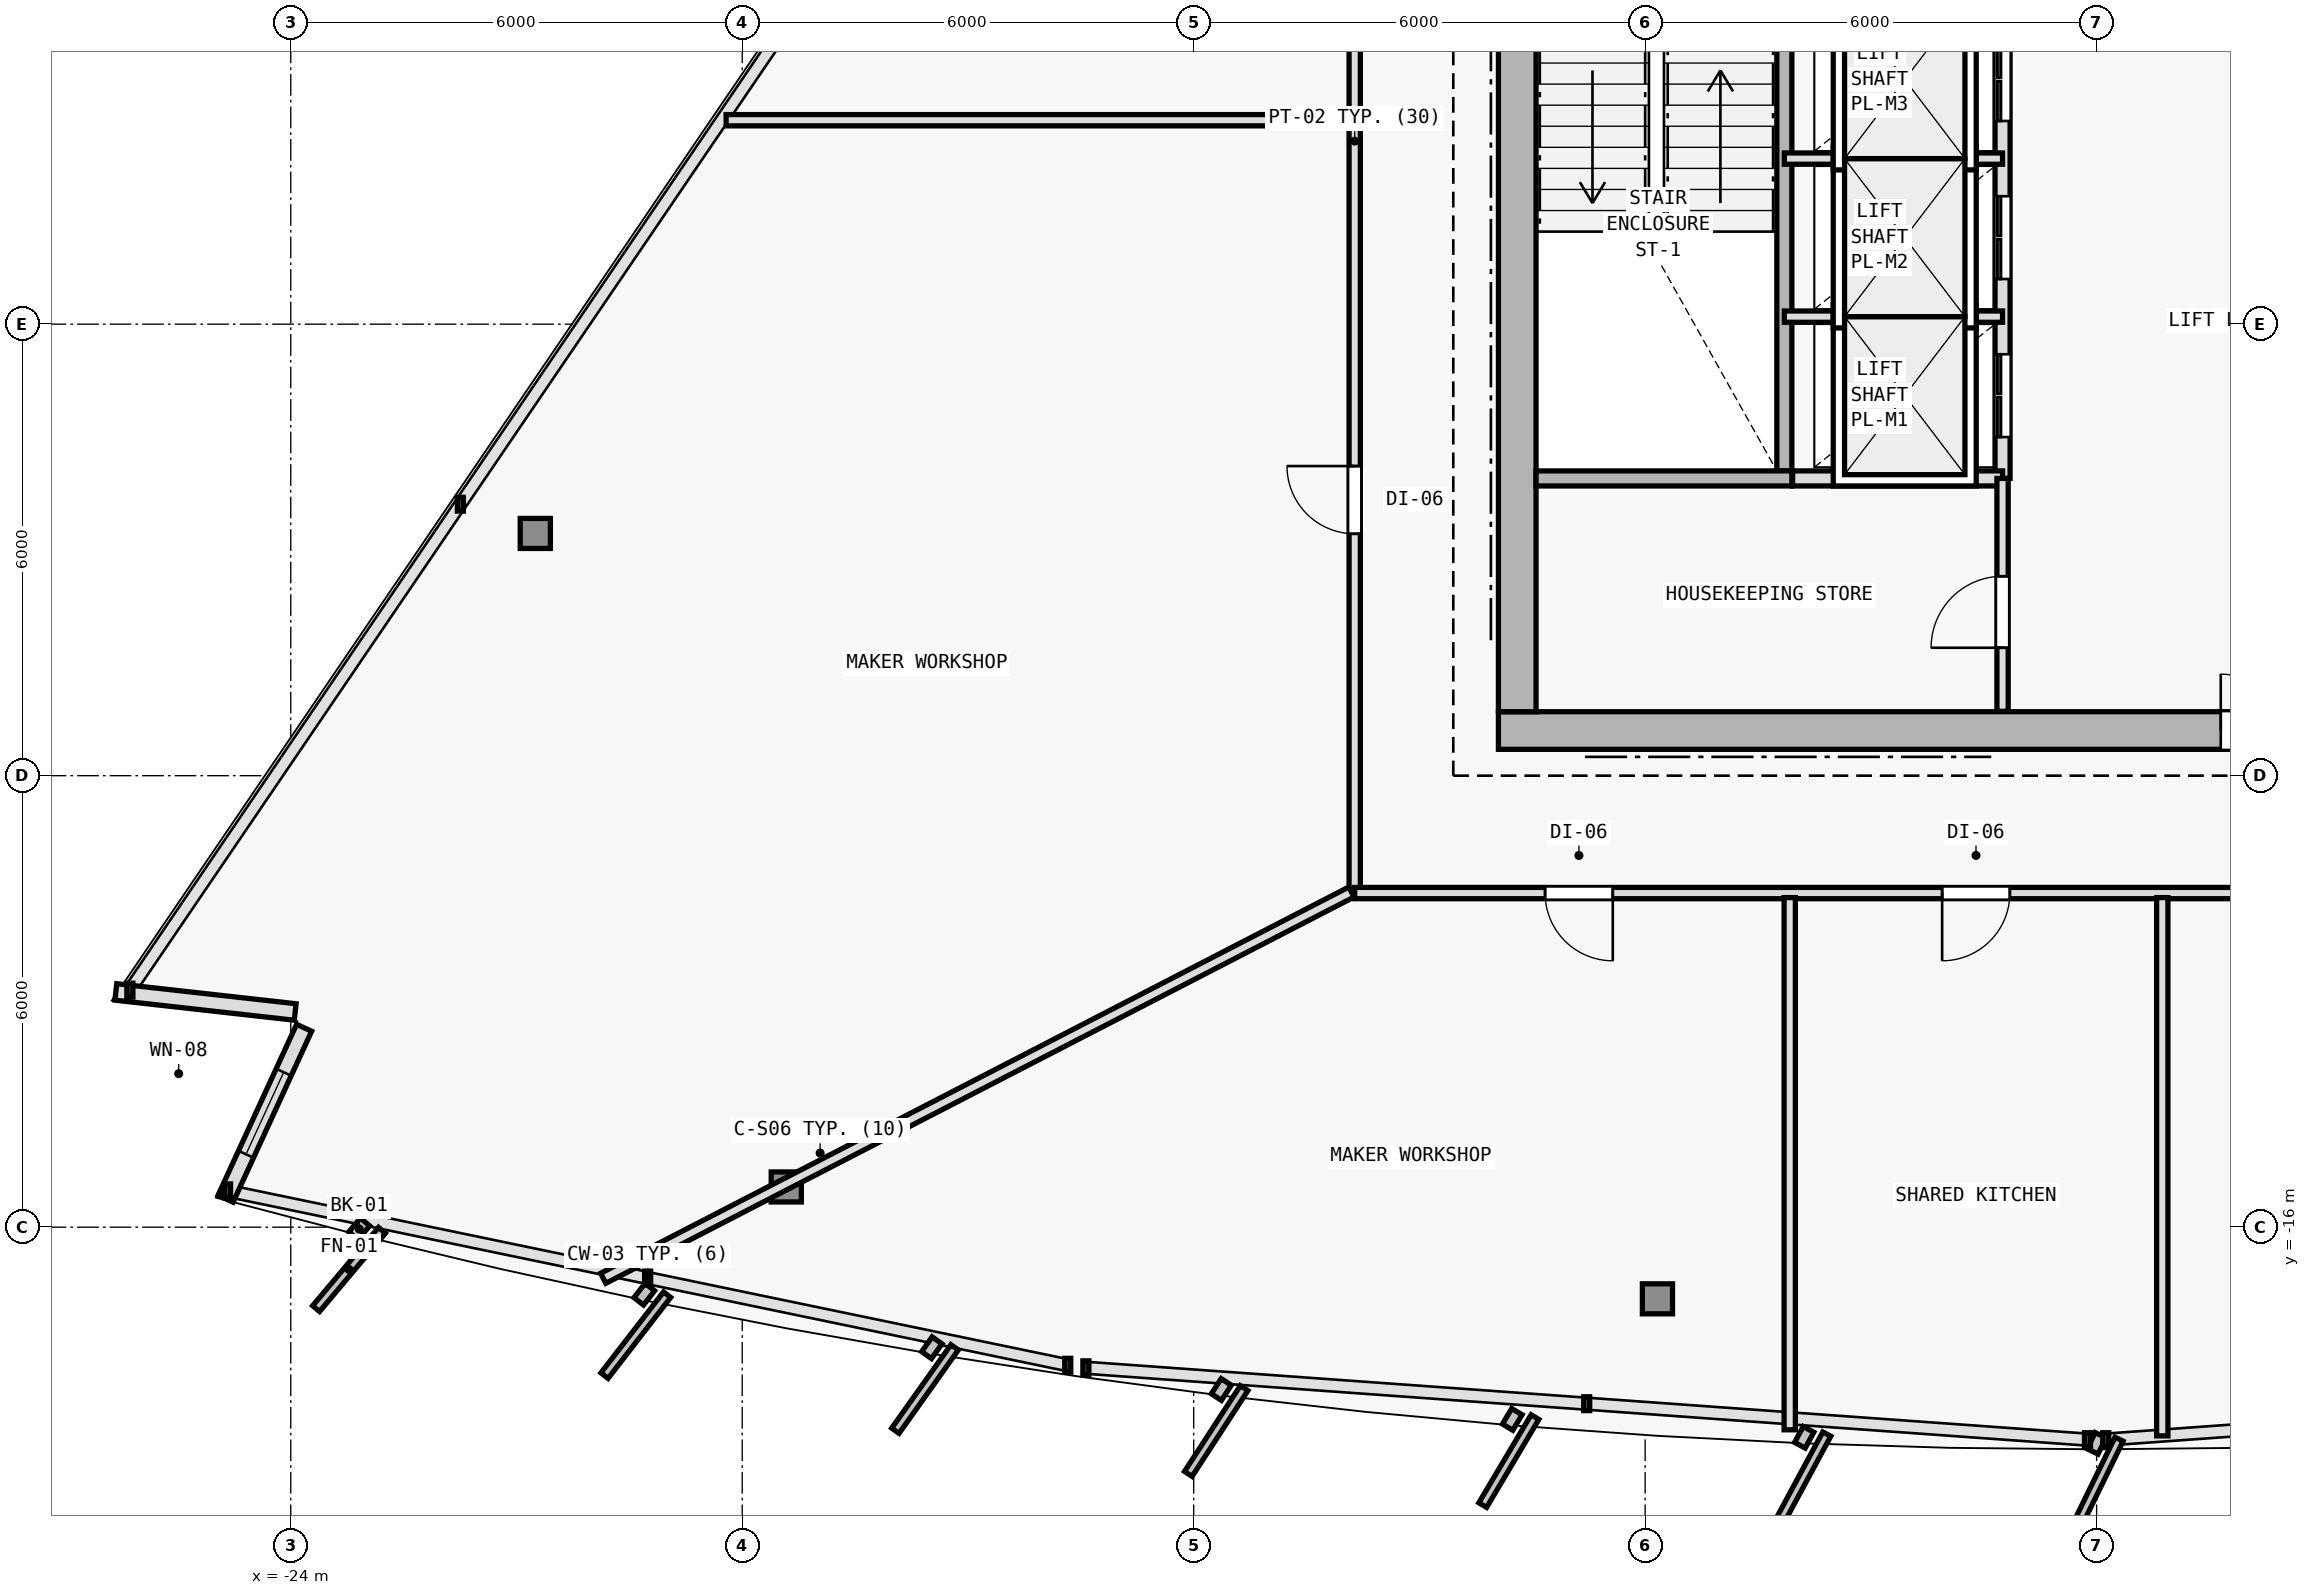
"""IFC4 building model, lengths in metres.
Left out: names, types, materials, properties, quantities, classifications, styles, units other than length and angle.
Written with IfcOpenShell. Run it as: python <this file> out.ifc"""

import sys

from ifc_helpers import new_model, si_unit, direction, frame, frame_2d, origin, origin_2d, place, context, subcontext, project, spatial, rectangle, i_section, extrude, element, fill, save


model = new_model("IFC4")
c1 = context("Model", 3, precision=1e-05, world=origin(), true_north=direction((0.0, 1.0)))
c2 = subcontext(c1, "Body", "Model", "MODEL_VIEW")
j1 = project(units=[si_unit("LENGTHUNIT", "METRE"), si_unit("PLANEANGLEUNIT", "RADIAN")], contexts=[c1])
p1 = place(None, origin())
s1 = spatial("IfcSite", under=j1, at=p1, CompositionType="ELEMENT")
p2 = place(p1, origin())
s2 = spatial("IfcBuilding", under=s1, at=p2, CompositionType="ELEMENT")
p3 = place(p2, frame((0.0, 0.0, 174.6)))
s3 = spatial("IfcBuildingStorey", under=s2, at=p3, CompositionType="ELEMENT", Elevation=174.6)
for number, where, z_axis, x_axis in (
    (1, (-7.7, -9.4, 0.0), (0.0, 0.0, 1.0), (1.0, 0.0, 0.0)),
    (2, (0.0, -9.4, 0.0), (0.0, 0.0, 1.0), (1.0, 0.0, 0.0)),
):
    element("IfcColumn", number, at=place(p3, frame(where, z_axis=z_axis, x_axis=x_axis)), inside=s3, PredefinedType="COLUMN", context=c2, shape_type="SweptSolid", body=[
        extrude(i_section(OverallWidth=0.404, OverallDepth=0.407, WebThickness=0.017, FlangeThickness=0.028, FilletRadius=0.015, at=origin_2d()), origin(), (0.0, 0.0, 1.0), 3.6),
    ])
p4 = place(p3, frame((-17.415, -15.465, 0.005), z_axis=(0.021205716244, 0.034391321857, 0.999183443908), x_axis=(-0.851195920716, 0.524848077596, 0.0)))
e3 = element("IfcColumn", 3, at=p4, inside=s3, PredefinedType="COLUMN", context=c2, shape_type="SweptSolid", body=[
    extrude(i_section(OverallWidth=0.401, OverallDepth=0.399, WebThickness=0.016, FlangeThickness=0.025, FilletRadius=0.015, at=origin_2d()), origin(), (0.0, 0.0, 1.0), 3.592),
])
p5 = place(p3, frame((-5.836, -16.952, 0.005), z_axis=(0.007069526978, 0.036231325765, 0.999318424138), x_axis=(-0.981490592026, 0.19151035942, 0.0)))
e4 = element("IfcColumn", 4, at=p5, inside=s3, PredefinedType="COLUMN", context=c2, shape_type="SweptSolid", body=[
    extrude(i_section(OverallWidth=0.401, OverallDepth=0.399, WebThickness=0.016, FlangeThickness=0.025, FilletRadius=0.015, at=origin_2d()), origin(), (0.0, 0.0, 1.0), 3.592),
])
p6 = place(p3, frame((-20.75, -6.781, 0.005), z_axis=(0.025969478805, 0.022162434791, 0.999417036404), x_axis=(-0.649149996291, 0.760660425102, 0.0)))
e5 = element("IfcColumn", 5, at=p6, inside=s3, PredefinedType="COLUMN", context=c2, shape_type="SweptSolid", body=[
    extrude(i_section(OverallWidth=0.401, OverallDepth=0.399, WebThickness=0.016, FlangeThickness=0.025, FilletRadius=0.015, at=origin_2d()), origin(), (0.0, 0.0, 1.0), 3.591),
])
p7 = place(p3, frame((-23.941, -13.14, 0.0), z_axis=(0.0, 0.0, 1.0), x_axis=(-0.993825249999, 0.110956624245, 0.0)))
e6 = element("IfcWall", 6, at=p7, inside=s3, PredefinedType="SOLIDWALL", context=c2, shape_type="SweptSolid", body=[
    extrude(rectangle(XDim=2.398, YDim=0.22, at=frame_2d((1.199, 0.0))), origin(), (0.0, 0.0, 1.0), 3.35),
])
p8 = place(p3, frame((-24.866, -15.622, 0.0), z_axis=(0.0, 0.0, 1.0), x_axis=(0.417478378529, 0.908686856657, 0.0)))
e7 = element("IfcWall", 7, at=p8, inside=s3, PredefinedType="SOLIDWALL", context=c2, shape_type="SweptSolid", body=[
    extrude(rectangle(XDim=2.5, YDim=0.22, at=frame_2d((1.25, 0.0))), origin(), (0.0, 0.0, 1.0), 3.35),
])
p9 = place(p8, frame((0.65, 0.0, 0.62)))
e8 = element("IfcOpeningElement", 8, at=p9, cuts=e7, PredefinedType="OPENING", context=c2, shape_type="SweptSolid", body=[
    extrude(rectangle(XDim=1.2, YDim=1.8, at=frame_2d((0.6, 0.9))), frame((0.0, 0.12, 0.0), z_axis=(0.0, -1.0, 0.0), x_axis=(1.0, 0.0, 0.0)), (0.0, 0.0, 1.0), 0.24),
])
p10 = place(p3, frame((-7.95, -9.4, 0.0), z_axis=(0.0, 0.0, 1.0), x_axis=(1.0, 0.0, 0.0)))
e9 = element("IfcWall", 9, at=p10, inside=s3, PredefinedType="SHEAR", context=c2, shape_type="SweptSolid", body=[
    extrude(rectangle(XDim=15.9, YDim=0.5, at=frame_2d((7.95, 0.0))), origin(), (0.0, 0.0, 1.0), 3.35),
])
p11 = place(p10, frame((9.6, 0.0, 0.0)))
e10 = element("IfcOpeningElement", 10, at=p11, cuts=e9, PredefinedType="OPENING", context=c2, shape_type="SweptSolid", body=[
    extrude(rectangle(XDim=1.5, YDim=2.2, at=frame_2d((0.75, 1.1))), frame((0.0, 0.26, 0.0), z_axis=(0.0, -1.0, 0.0), x_axis=(1.0, 0.0, 0.0)), (0.0, 0.0, 1.0), 0.52),
])
p12 = place(p3, frame((-7.7, -9.15, 0.0), z_axis=(0.0, 0.0, 1.0), x_axis=(0.0, 1.0, 0.0)))
e11 = element("IfcWall", 11, at=p12, inside=s3, PredefinedType="SHEAR", context=c2, shape_type="SweptSolid", body=[
    extrude(rectangle(XDim=19.1, YDim=0.5, at=frame_2d((9.55, 0.0))), origin(), (0.0, 0.0, 1.0), 3.35),
])
p13 = place(p12, frame((12.7, 0.0, 0.0)))
e12 = element("IfcOpeningElement", 12, at=p13, cuts=e11, PredefinedType="OPENING", context=c2, shape_type="SweptSolid", body=[
    extrude(rectangle(XDim=1.1, YDim=2.15, at=frame_2d((0.55, 1.075))), frame((0.0, 0.26, 0.0), z_axis=(0.0, -1.0, 0.0), x_axis=(1.0, 0.0, 0.0)), (0.0, 0.0, 1.0), 0.52),
])
p14 = place(p3, frame((-4.15, -5.95, 0.0), z_axis=(0.0, 0.0, 1.0), x_axis=(0.0, 1.0, 0.0)))
e13 = element("IfcWall", 13, at=p14, inside=s3, PredefinedType="SOLIDWALL", context=c2, shape_type="SweptSolid", body=[
    extrude(rectangle(XDim=7.2, YDim=0.2, at=frame_2d((3.6, 0.0))), origin(), (0.0, 0.0, 1.0), 3.35),
])
p15 = place(p3, frame((-1.25, -6.05, 0.0), z_axis=(0.0, 0.0, 1.0), x_axis=(0.0, 1.0, 0.0)))
e14 = element("IfcWall", 14, at=p15, inside=s3, PredefinedType="SOLIDWALL", context=c2, shape_type="SweptSolid", body=[
    extrude(rectangle(XDim=8.7, YDim=0.2, at=frame_2d((4.35, 0.0))), origin(), (0.0, 0.0, 1.0), 3.35),
])
p16 = place(p15, frame((0.55, 0.0, 0.0)))
e15 = element("IfcOpeningElement", 15, at=p16, cuts=e14, PredefinedType="OPENING", context=c2, shape_type="SweptSolid", body=[
    extrude(rectangle(XDim=1.1, YDim=2.15, at=frame_2d((0.55, 1.075))), frame((0.0, 0.11, 0.0), z_axis=(0.0, -1.0, 0.0), x_axis=(1.0, 0.0, 0.0)), (0.0, 0.0, 1.0), 0.22),
])
p17 = place(p15, frame((2.65, 0.0, 0.0)))
e16 = element("IfcOpeningElement", 16, at=p17, cuts=e14, PredefinedType="OPENING", context=c2, shape_type="SweptSolid", body=[
    extrude(rectangle(XDim=1.1, YDim=2.15, at=frame_2d((0.55, 1.075))), frame((0.0, 0.11, 0.0), z_axis=(0.0, -1.0, 0.0), x_axis=(1.0, 0.0, 0.0)), (0.0, 0.0, 1.0), 0.22),
])
p18 = place(p15, frame((4.75, 0.0, 0.0)))
e17 = element("IfcOpeningElement", 17, at=p18, cuts=e14, PredefinedType="OPENING", context=c2, shape_type="SweptSolid", body=[
    extrude(rectangle(XDim=1.1, YDim=2.15, at=frame_2d((0.55, 1.075))), frame((0.0, 0.11, 0.0), z_axis=(0.0, -1.0, 0.0), x_axis=(1.0, 0.0, 0.0)), (0.0, 0.0, 1.0), 0.22),
])
p19 = place(p15, frame((6.85, 0.0, 0.0)))
e18 = element("IfcOpeningElement", 18, at=p19, cuts=e14, PredefinedType="OPENING", context=c2, shape_type="SweptSolid", body=[
    extrude(rectangle(XDim=1.1, YDim=2.15, at=frame_2d((0.55, 1.075))), frame((0.0, 0.11, 0.0), z_axis=(0.0, -1.0, 0.0), x_axis=(1.0, 0.0, 0.0)), (0.0, 0.0, 1.0), 0.22),
])
for number, where, z_axis, x_axis in (
    (19, (-4.15, -3.9, 0.0), (0.0, 0.0, 1.0), (1.0, 0.0, 0.0)),
    (20, (-4.15, -1.8, 0.0), (0.0, 0.0, 1.0), (1.0, 0.0, 0.0)),
):
    element("IfcWall", number, at=place(p3, frame(where, z_axis=z_axis, x_axis=x_axis)), inside=s3, PredefinedType="PARTITIONING", context=c2, shape_type="SweptSolid", body=[
        extrude(rectangle(XDim=2.9, YDim=0.15, at=frame_2d((1.45, 0.0))), origin(), (0.0, 0.0, 1.0), 3.35),
    ])
p20 = place(p3, frame((-7.45, -6.05, 0.0), z_axis=(0.0, 0.0, 1.0), x_axis=(1.0, 0.0, 0.0)))
e21 = element("IfcWall", 21, at=p20, inside=s3, PredefinedType="SOLIDWALL", context=c2, shape_type="SweptSolid", body=[
    extrude(rectangle(XDim=3.4, YDim=0.2, at=frame_2d((1.7, 0.0))), origin(), (0.0, 0.0, 1.0), 3.35),
])
p21 = place(p3, frame((-4.04, -6.05, 0.0), z_axis=(0.0, 0.0, 1.0), x_axis=(1.0, 0.0, 0.0)))
e22 = element("IfcWall", 22, at=p21, inside=s3, PredefinedType="SOLIDWALL", context=c2, shape_type="SweptSolid", body=[
    extrude(rectangle(XDim=2.79, YDim=0.2, at=frame_2d((1.395, 0.0))), origin(), (0.0, 0.0, 1.0), 3.35),
])
p22 = place(p3, frame((-1.25, -9.145, 0.0), z_axis=(0.0, 0.0, 1.0), x_axis=(0.0, 1.0, 0.0)))
e23 = element("IfcWall", 23, at=p22, inside=s3, PredefinedType="PARTITIONING", context=c2, shape_type="SweptSolid", body=[
    extrude(rectangle(XDim=3.095, YDim=0.15, at=frame_2d((1.547, 0.0))), origin(), (0.0, 0.0, 1.0), 3.35),
])
p23 = place(p22, frame((0.845, 0.0, 0.0)))
e24 = element("IfcOpeningElement", 24, at=p23, cuts=e23, PredefinedType="OPENING", context=c2, shape_type="SweptSolid", body=[
    extrude(rectangle(XDim=0.95, YDim=2.1, at=frame_2d((0.475, 1.05))), frame((0.0, 0.085, 0.0), z_axis=(0.0, -1.0, 0.0), x_axis=(1.0, 0.0, 0.0)), (0.0, 0.0, 1.0), 0.17),
])
p24 = place(p3, frame((-9.86, -11.56, 0.0), z_axis=(0.0, 0.0, 1.0), x_axis=(0.0, 1.0, 0.0)))
e25 = element("IfcWall", 25, at=p24, inside=s3, PredefinedType="PARTITIONING", context=c2, shape_type="SweptSolid", body=[
    extrude(rectangle(XDim=19.986, YDim=0.15, at=frame_2d((9.993, 0.0))), origin(), (0.0, 0.0, 1.0), 2.825),
])
p25 = place(p24, frame((4.774, 0.0, 0.0)))
e26 = element("IfcOpeningElement", 26, at=p25, cuts=e25, PredefinedType="OPENING", context=c2, shape_type="SweptSolid", body=[
    extrude(rectangle(XDim=0.9, YDim=2.1, at=frame_2d((0.45, 1.05))), frame((0.0, 0.085, 0.0), z_axis=(0.0, -1.0, 0.0), x_axis=(1.0, 0.0, 0.0)), (0.0, 0.0, 1.0), 0.17),
])
p26 = place(p24, frame((14.589, 0.0, 0.0)))
e27 = element("IfcOpeningElement", 27, at=p26, cuts=e25, PredefinedType="OPENING", context=c2, shape_type="SweptSolid", body=[
    extrude(rectangle(XDim=0.9, YDim=2.1, at=frame_2d((0.45, 1.05))), frame((0.0, 0.085, 0.0), z_axis=(0.0, -1.0, 0.0), x_axis=(1.0, 0.0, 0.0)), (0.0, 0.0, 1.0), 0.17),
])
p27 = place(p3, frame((13.18, -11.56, 0.0), z_axis=(0.0, 0.0, 1.0), x_axis=(-1.0, 0.0, 0.0)))
e28 = element("IfcWall", 28, at=p27, inside=s3, PredefinedType="PARTITIONING", context=c2, shape_type="SweptSolid", body=[
    extrude(rectangle(XDim=23.04, YDim=0.15, at=frame_2d((11.52, 0.0))), origin(), (0.0, 0.0, 1.0), 2.825),
])
p28 = place(p27, frame((19.61, 0.0, 0.0)))
e29 = element("IfcOpeningElement", 29, at=p28, cuts=e28, PredefinedType="OPENING", context=c2, shape_type="SweptSolid", body=[
    extrude(rectangle(XDim=0.9, YDim=2.1, at=frame_2d((0.45, 1.05))), frame((0.0, 0.085, 0.0), z_axis=(0.0, -1.0, 0.0), x_axis=(1.0, 0.0, 0.0)), (0.0, 0.0, 1.0), 0.17),
])
p29 = place(p27, frame((14.333, 0.0, 0.0)))
e30 = element("IfcOpeningElement", 30, at=p29, cuts=e28, PredefinedType="OPENING", context=c2, shape_type="SweptSolid", body=[
    extrude(rectangle(XDim=0.9, YDim=2.1, at=frame_2d((0.45, 1.05))), frame((0.0, 0.085, 0.0), z_axis=(0.0, -1.0, 0.0), x_axis=(1.0, 0.0, 0.0)), (0.0, 0.0, 1.0), 0.17),
])
p30 = place(p27, frame((9.382, 0.0, 0.0)))
e31 = element("IfcOpeningElement", 31, at=p30, cuts=e28, PredefinedType="OPENING", context=c2, shape_type="SweptSolid", body=[
    extrude(rectangle(XDim=0.9, YDim=2.1, at=frame_2d((0.45, 1.05))), frame((0.0, 0.085, 0.0), z_axis=(0.0, -1.0, 0.0), x_axis=(1.0, 0.0, 0.0)), (0.0, 0.0, 1.0), 0.17),
])
p31 = place(p27, frame((3.317, 0.0, 0.0)))
e32 = element("IfcOpeningElement", 32, at=p31, cuts=e28, PredefinedType="OPENING", context=c2, shape_type="SweptSolid", body=[
    extrude(rectangle(XDim=0.9, YDim=2.1, at=frame_2d((0.45, 1.05))), frame((0.0, 0.085, 0.0), z_axis=(0.0, -1.0, 0.0), x_axis=(1.0, 0.0, 0.0)), (0.0, 0.0, 1.0), 0.17),
])
p32 = place(p3, frame((-9.903, -11.546, 0.0), z_axis=(0.0, 0.0, 1.0), x_axis=(-0.888597997178, -0.45868682062, 0.0)))
e33 = element("IfcWall", 33, at=p32, inside=s3, PredefinedType="PARTITIONING", context=c2, shape_type="SweptSolid", body=[
    extrude(rectangle(XDim=11.191, YDim=0.15, at=frame_2d((5.595, 0.0))), origin(), (0.0, 0.0, 1.0), 2.775),
])
p33 = place(p3, frame((-9.92, -1.29, 0.0), z_axis=(0.0, 0.0, 1.0), x_axis=(-1.0, 0.0, 0.0)))
e34 = element("IfcWall", 34, at=p33, inside=s3, PredefinedType="PARTITIONING", context=c2, shape_type="SweptSolid", body=[
    extrude(rectangle(XDim=8.294, YDim=0.15, at=frame_2d((4.147, 0.0))), origin(), (0.0, 0.0, 1.0), 2.825),
])
p34 = place(p3, frame((-4.078, -11.62, 0.0), z_axis=(0.0, 0.0, 1.0), x_axis=(0.0, -1.0, 0.0)))
e35 = element("IfcWall", 35, at=p34, inside=s3, PredefinedType="PARTITIONING", context=c2, shape_type="SweptSolid", body=[
    extrude(rectangle(XDim=7.072, YDim=0.15, at=frame_2d((3.536, 0.0))), origin(), (0.0, 0.0, 1.0), 2.825),
])
p35 = place(p3, frame((0.873, -11.62, 0.0), z_axis=(0.0, 0.0, 1.0), x_axis=(0.0, -1.0, 0.0)))
e36 = element("IfcWall", 36, at=p35, inside=s3, PredefinedType="PARTITIONING", context=c2, shape_type="SweptSolid", body=[
    extrude(rectangle(XDim=7.153, YDim=0.15, at=frame_2d((3.577, 0.0))), origin(), (0.0, 0.0, 1.0), 2.925),
])
p36 = place(p9, origin())
e37 = element("IfcWindow", 37, at=p36, inside=s3, PartitioningType="SINGLE_PANEL", PredefinedType="WINDOW", context=c2, shape_type="SweptSolid", body=[
    extrude(rectangle(XDim=1.2, YDim=1.8, at=frame_2d((0.6, 0.9))), frame((0.0, 0.03, 0.0), z_axis=(0.0, -1.0, 0.0), x_axis=(1.0, 0.0, 0.0)), (0.0, 0.0, 1.0), 0.06),
])
fill(e8, e37)
p37 = place(p11, origin())
e38 = element("IfcDoor", 38, at=p37, inside=s3, OperationType="DOUBLE_DOOR_SINGLE_SWING", PredefinedType="DOOR", context=c2, shape_type="SweptSolid", body=[
    extrude(rectangle(XDim=1.5, YDim=2.2, at=frame_2d((0.75, 1.1))), frame((0.0, 0.025, 0.0), z_axis=(0.0, -1.0, 0.0), x_axis=(1.0, 0.0, 0.0)), (0.0, 0.0, 1.0), 0.05),
])
fill(e10, e38)
p38 = place(p16, origin())
e39 = element("IfcDoor", 39, at=p38, inside=s3, OperationType="DOUBLE_DOOR_SLIDING", PredefinedType="DOOR", context=c2, shape_type="SweptSolid", body=[
    extrude(rectangle(XDim=1.1, YDim=2.15, at=frame_2d((0.55, 1.075))), frame((0.0, 0.025, 0.0), z_axis=(0.0, -1.0, 0.0), x_axis=(1.0, 0.0, 0.0)), (0.0, 0.0, 1.0), 0.05),
])
fill(e15, e39)
p39 = place(p17, origin())
e40 = element("IfcDoor", 40, at=p39, inside=s3, OperationType="DOUBLE_DOOR_SLIDING", PredefinedType="DOOR", context=c2, shape_type="SweptSolid", body=[
    extrude(rectangle(XDim=1.1, YDim=2.15, at=frame_2d((0.55, 1.075))), frame((0.0, 0.025, 0.0), z_axis=(0.0, -1.0, 0.0), x_axis=(1.0, 0.0, 0.0)), (0.0, 0.0, 1.0), 0.05),
])
fill(e16, e40)
p40 = place(p18, origin())
e41 = element("IfcDoor", 41, at=p40, inside=s3, OperationType="DOUBLE_DOOR_SLIDING", PredefinedType="DOOR", context=c2, shape_type="SweptSolid", body=[
    extrude(rectangle(XDim=1.1, YDim=2.15, at=frame_2d((0.55, 1.075))), frame((0.0, 0.025, 0.0), z_axis=(0.0, -1.0, 0.0), x_axis=(1.0, 0.0, 0.0)), (0.0, 0.0, 1.0), 0.05),
])
fill(e17, e41)
p41 = place(p23, origin())
e42 = element("IfcDoor", 42, at=p41, inside=s3, OperationType="SINGLE_SWING_LEFT", PredefinedType="DOOR", context=c2, shape_type="SweptSolid", body=[
    extrude(rectangle(XDim=0.95, YDim=2.1, at=frame_2d((0.475, 1.05))), frame((0.0, 0.025, 0.0), z_axis=(0.0, -1.0, 0.0), x_axis=(1.0, 0.0, 0.0)), (0.0, 0.0, 1.0), 0.05),
])
fill(e24, e42)
p42 = place(p25, origin())
e43 = element("IfcDoor", 43, at=p42, inside=s3, OperationType="SINGLE_SWING_RIGHT", PredefinedType="DOOR", context=c2, shape_type="SweptSolid", body=[
    extrude(rectangle(XDim=0.9, YDim=2.1, at=frame_2d((0.45, 1.05))), frame((0.0, 0.025, 0.0), z_axis=(0.0, -1.0, 0.0), x_axis=(1.0, 0.0, 0.0)), (0.0, 0.0, 1.0), 0.05),
])
fill(e26, e43)
p43 = place(p28, origin())
e44 = element("IfcDoor", 44, at=p43, inside=s3, OperationType="SINGLE_SWING_LEFT", PredefinedType="DOOR", context=c2, shape_type="SweptSolid", body=[
    extrude(rectangle(XDim=0.9, YDim=2.1, at=frame_2d((0.45, 1.05))), frame((0.0, 0.025, 0.0), z_axis=(0.0, -1.0, 0.0), x_axis=(1.0, 0.0, 0.0)), (0.0, 0.0, 1.0), 0.05),
])
fill(e29, e44)
p44 = place(p29, origin())
e45 = element("IfcDoor", 45, at=p44, inside=s3, OperationType="SINGLE_SWING_RIGHT", PredefinedType="DOOR", context=c2, shape_type="SweptSolid", body=[
    extrude(rectangle(XDim=0.9, YDim=2.1, at=frame_2d((0.45, 1.05))), frame((0.0, 0.025, 0.0), z_axis=(0.0, -1.0, 0.0), x_axis=(1.0, 0.0, 0.0)), (0.0, 0.0, 1.0), 0.05),
])
fill(e30, e45)
save(model, sys.argv[1])
